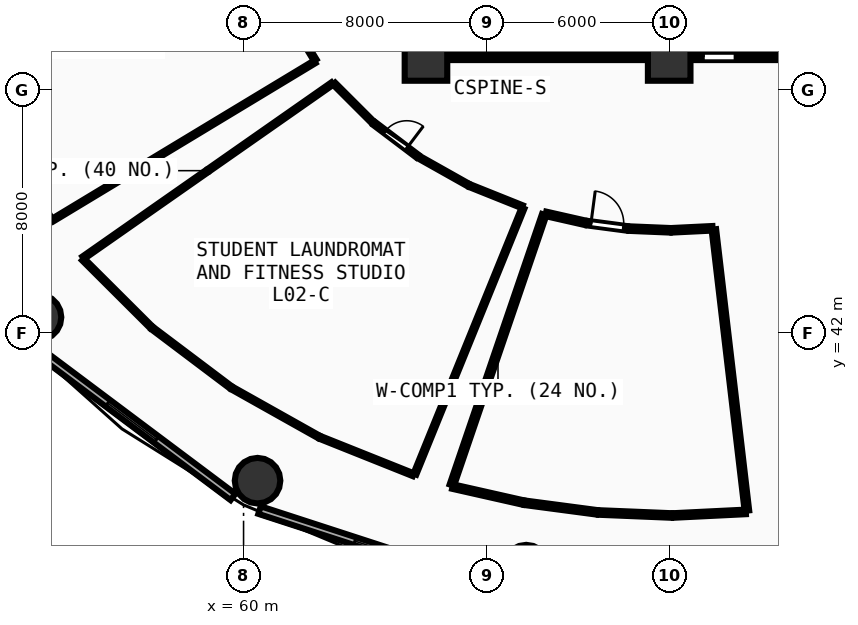
"""IFC4 building model, lengths in metres.
Left out: names, types, materials, properties, quantities, classifications, styles, units other than length and angle.
Written with IfcOpenShell. Run it as: python <this file> out.ifc"""

import sys

from ifc_helpers import new_model, si_unit, direction, frame, frame_2d, origin, origin_2d, place, context, subcontext, project, spatial, rectangle, circle, extrude, element, fill, save


model = new_model("IFC4")
c1 = context("Model", 3, precision=1e-05, world=origin(), true_north=direction((0.0, 1.0)))
c2 = subcontext(c1, "Body", "Model", "MODEL_VIEW")
j1 = project(units=[si_unit("LENGTHUNIT", "METRE"), si_unit("PLANEANGLEUNIT", "RADIAN")], contexts=[c1])
p1 = place(None, origin())
s1 = spatial("IfcSite", under=j1, at=p1, CompositionType="ELEMENT")
p2 = place(p1, origin())
s2 = spatial("IfcBuilding", under=s1, at=p2, CompositionType="ELEMENT")
p3 = place(p2, frame((0.0, 0.0, 9.0)))
s3 = spatial("IfcBuildingStorey", under=s2, at=p3, CompositionType="ELEMENT", Elevation=9.0)
for number, where, z_axis, x_axis in (
    (1, (66.0, 51.0, 0.0), (0.0, 0.0, 1.0), (1.0, 0.0, 0.0)),
    (2, (74.0, 51.0, 0.0), (0.0, 0.0, 1.0), (1.0, 0.0, 0.0)),
):
    element("IfcColumn", number, at=place(p3, frame(where, z_axis=z_axis, x_axis=x_axis)), inside=s3, PredefinedType="PILASTER", context=c2, shape_type="SweptSolid", body=[
        extrude(rectangle(XDim=1.4, YDim=1.4, at=origin_2d()), origin(), (0.0, 0.0, 1.0), 4.5),
    ])
for number, where, z_axis, x_axis in (
    (3, (53.256, 42.522, 0.0), (0.0, 0.0, 1.0), (1.0, 0.0, 0.0)),
    (4, (60.46, 37.146, 0.0), (0.0, 0.0, 1.0), (1.0, 0.0, 0.0)),
    (5, (69.298, 34.286, 0.0), (0.0, 0.0, 1.0), (1.0, 0.0, 0.0)),
):
    element("IfcColumn", number, at=place(p3, frame(where, z_axis=z_axis, x_axis=x_axis)), inside=s3, PredefinedType="COLUMN", context=c2, shape_type="SweptSolid", body=[
        extrude(circle(Radius=0.75, at=origin_2d()), origin(), (0.0, 0.0, 1.0), 4.5),
    ])
p4 = place(p3, frame((53.016, 41.582, 0.0), z_axis=(0.0, 0.0, 1.0), x_axis=(0.80030733173, -0.599590005569, 0.0)))
e6 = element("IfcWall", 6, at=p4, inside=s3, PredefinedType="SOLIDWALL", context=c2, shape_type="SweptSolid", body=[
    extrude(rectangle(XDim=8.291, YDim=0.26, at=frame_2d((4.145, 0.0))), origin(), (0.0, 0.0, 1.0), 4.085),
])
p5 = place(p4, frame((3.145, 0.0, 0.85)))
e7 = element("IfcOpeningElement", 7, at=p5, cuts=e6, PredefinedType="OPENING", context=c2, shape_type="SweptSolid", body=[
    extrude(rectangle(XDim=2.0, YDim=1.75, at=frame_2d((1.0, 0.875))), frame((0.0, 0.14, 0.0), z_axis=(0.0, -1.0, 0.0), x_axis=(1.0, 0.0, 0.0)), (0.0, 0.0, 1.0), 0.28),
])
p6 = place(p3, frame((60.526, 36.178, 0.0), z_axis=(0.0, 0.0, 1.0), x_axis=(0.951039914291, -0.309068085421, 0.0)))
e8 = element("IfcWall", 8, at=p6, inside=s3, PredefinedType="SOLIDWALL", context=c2, shape_type="SweptSolid", body=[
    extrude(rectangle(XDim=8.594, YDim=0.26, at=frame_2d((4.297, 0.0))), origin(), (0.0, 0.0, 1.0), 4.085),
])
p7 = place(p6, frame((3.297, 0.0, 0.85)))
e9 = element("IfcOpeningElement", 9, at=p7, cuts=e8, PredefinedType="OPENING", context=c2, shape_type="SweptSolid", body=[
    extrude(rectangle(XDim=2.0, YDim=1.75, at=frame_2d((1.0, 0.875))), frame((0.0, 0.14, 0.0), z_axis=(0.0, -1.0, 0.0), x_axis=(1.0, 0.0, 0.0)), (0.0, 0.0, 1.0), 0.28),
])
p8 = place(p3, frame((74.0, 51.08, 0.0), z_axis=(0.0, 0.0, 1.0), x_axis=(1.0, 0.0, 0.0)))
e10 = element("IfcWall", 10, at=p8, inside=s3, PredefinedType="SHEAR", context=c2, shape_type="SweptSolid", body=[
    extrude(rectangle(XDim=7.9, YDim=0.2, at=frame_2d((3.95, 0.0))), origin(), (0.0, 0.0, 1.0), 4.1),
])
p9 = place(p8, frame((1.12, 0.0, 0.0)))
e11 = element("IfcOpeningElement", 11, at=p9, cuts=e10, PredefinedType="OPENING", context=c2, shape_type="SweptSolid", body=[
    extrude(rectangle(XDim=1.05, YDim=2.1, at=frame_2d((0.525, 1.05))), frame((0.0, 0.11, 0.0), z_axis=(0.0, -1.0, 0.0), x_axis=(1.0, 0.0, 0.0)), (0.0, 0.0, 1.0), 0.22),
])
p10 = place(p3, frame((74.62, 54.27, 0.0), z_axis=(0.0, 0.0, 1.0), x_axis=(0.0, -1.0, 0.0)))
e12 = element("IfcWall", 12, at=p10, inside=s3, PredefinedType="SHEAR", context=c2, shape_type="SweptSolid", body=[
    extrude(rectangle(XDim=3.07, YDim=0.2, at=frame_2d((1.535, 0.0))), origin(), (0.0, 0.0, 1.0), 4.1),
])
p11 = place(p3, frame((66.26, 51.08, 0.0), z_axis=(0.0, 0.0, 1.0), x_axis=(1.0, 0.0, 0.0)))
e13 = element("IfcWall", 13, at=p11, inside=s3, PredefinedType="SHEAR", context=c2, shape_type="SweptSolid", body=[
    extrude(rectangle(XDim=7.16, YDim=0.2, at=frame_2d((3.58, 0.0))), origin(), (0.0, 0.0, 1.0), 4.1),
])
p12 = place(p3, frame((73.54, 51.2, 0.0), z_axis=(0.0, 0.0, 1.0), x_axis=(0.0, 1.0, 0.0)))
e14 = element("IfcWall", 14, at=p12, inside=s3, PredefinedType="SHEAR", context=c2, shape_type="SweptSolid", body=[
    extrude(rectangle(XDim=3.07, YDim=0.2, at=frame_2d((1.535, 0.0))), origin(), (0.0, 0.0, 1.0), 4.1),
])
p13 = place(p3, frame((66.14, 54.27, 0.0), z_axis=(0.0, 0.0, 1.0), x_axis=(0.0, -1.0, 0.0)))
e15 = element("IfcWall", 15, at=p13, inside=s3, PredefinedType="SHEAR", context=c2, shape_type="SweptSolid", body=[
    extrude(rectangle(XDim=3.07, YDim=0.2, at=frame_2d((1.535, 0.0))), origin(), (0.0, 0.0, 1.0), 4.1),
])
p14 = place(p13, frame((1.01, 0.0, 0.0)))
e16 = element("IfcOpeningElement", 16, at=p14, cuts=e15, PredefinedType="OPENING", context=c2, shape_type="SweptSolid", body=[
    extrude(rectangle(XDim=1.05, YDim=2.1, at=frame_2d((0.525, 1.05))), frame((0.0, 0.11, 0.0), z_axis=(0.0, -1.0, 0.0), x_axis=(1.0, 0.0, 0.0)), (0.0, 0.0, 1.0), 0.22),
])
p15 = place(p3, frame((64.309, 48.886, 0.0), z_axis=(0.0, 0.0, 1.0), x_axis=(0.797861385226, -0.602840949144, 0.0)))
e17 = element("IfcWall", 17, at=p15, inside=s3, PredefinedType="PARTITIONING", context=c2, shape_type="SweptSolid", body=[
    extrude(rectangle(XDim=1.758, YDim=0.12, at=frame_2d((0.879, 0.0))), origin(), (0.0, 0.0, 1.0), 3.485),
])
p16 = place(p15, frame((0.429, 0.0, 0.0)))
e18 = element("IfcOpeningElement", 18, at=p16, cuts=e17, PredefinedType="OPENING", context=c2, shape_type="SweptSolid", body=[
    extrude(rectangle(XDim=0.9, YDim=2.08, at=frame_2d((0.45, 1.04))), frame((0.0, 0.07, 0.0), z_axis=(0.0, -1.0, 0.0), x_axis=(1.0, 0.0, 0.0)), (0.0, 0.0, 1.0), 0.14),
])
p17 = place(p3, frame((71.324, 45.614, 0.0), z_axis=(0.0, 0.0, 1.0), x_axis=(0.991368591811, -0.131104214925, 0.0)))
e19 = element("IfcWall", 19, at=p17, inside=s3, PredefinedType="PARTITIONING", context=c2, shape_type="SweptSolid", body=[
    extrude(rectangle(XDim=1.283, YDim=0.15, at=frame_2d((0.642, 0.0))), origin(), (0.0, 0.0, 1.0), 4.09),
])
p18 = place(p17, frame((0.102, 0.0, 0.0)))
e20 = element("IfcOpeningElement", 20, at=p18, cuts=e19, PredefinedType="OPENING", context=c2, shape_type="SweptSolid", body=[
    extrude(rectangle(XDim=1.08, YDim=2.1, at=frame_2d((0.54, 1.05))), frame((0.0, 0.085, 0.0), z_axis=(0.0, -1.0, 0.0), x_axis=(1.0, 0.0, 0.0)), (0.0, 0.0, 1.0), 0.17),
])
p19 = place(p3, frame((61.164, 52.934, 0.0), z_axis=(0.0, 0.0, 1.0), x_axis=(0.520406594215, -0.853918600745, 0.0)))
e21 = element("IfcWall", 21, at=p19, inside=s3, PredefinedType="PARTITIONING", context=c2, shape_type="SweptSolid", body=[
    extrude(rectangle(XDim=2.291, YDim=0.1, at=frame_2d((1.146, 0.0))), origin(), (0.0, 0.0, 1.0), 4.09),
])
p20 = place(p3, frame((62.343, 50.922, 0.0), z_axis=(0.0, 0.0, 1.0), x_axis=(-0.856094808971, -0.516818805824, 0.0)))
e22 = element("IfcWall", 22, at=p20, inside=s3, PredefinedType="PARTITIONING", context=c2, shape_type="SweptSolid", body=[
    extrude(rectangle(XDim=10.069, YDim=0.1, at=frame_2d((5.034, 0.0))), origin(), (0.0, 0.0, 1.0), 3.485),
])
p21 = place(p3, frame((53.668, 45.732, 0.0), z_axis=(0.0, 0.0, 1.0), x_axis=(-0.521408625916, 0.853307122214, 0.0)))
e23 = element("IfcWall", 23, at=p21, inside=s3, PredefinedType="PARTITIONING", context=c2, shape_type="SweptSolid", body=[
    extrude(rectangle(XDim=4.057, YDim=0.1, at=frame_2d((2.028, 0.0))), origin(), (0.0, 0.0, 1.0), 4.09),
])
p22 = place(p3, frame((62.98, 50.202, 0.0), z_axis=(0.0, 0.0, 1.0), x_axis=(0.707382510062, -0.706830944752, 0.0)))
e24 = element("IfcWall", 24, at=p22, inside=s3, PredefinedType="PARTITIONING", context=c2, shape_type="SweptSolid", body=[
    extrude(rectangle(XDim=1.771, YDim=0.1, at=frame_2d((0.885, 0.0))), origin(), (0.0, 0.0, 1.0), 3.485),
])
p23 = place(p3, frame((65.794, 47.771, 0.0), z_axis=(0.0, 0.0, 1.0), x_axis=(0.871593417153, -0.490229451559, 0.0)))
e25 = element("IfcWall", 25, at=p23, inside=s3, PredefinedType="PARTITIONING", context=c2, shape_type="SweptSolid", body=[
    extrude(rectangle(XDim=1.823, YDim=0.1, at=frame_2d((0.912, 0.0))), origin(), (0.0, 0.0, 1.0), 3.485),
])
p24 = place(p3, frame((67.455, 46.842, 0.0), z_axis=(0.0, 0.0, 1.0), x_axis=(0.928312348694, -0.371801268505, 0.0)))
e26 = element("IfcWall", 26, at=p24, inside=s3, PredefinedType="PARTITIONING", context=c2, shape_type="SweptSolid", body=[
    extrude(rectangle(XDim=1.845, YDim=0.1, at=frame_2d((0.923, 0.0))), origin(), (0.0, 0.0, 1.0), 4.09),
])
p25 = place(p3, frame((69.19, 46.104, 0.0), z_axis=(0.0, 0.0, 1.0), x_axis=(-0.376680340497, -0.926343306276, 0.0)))
e27 = element("IfcWall", 27, at=p25, inside=s3, PredefinedType="PARTITIONING", context=c2, shape_type="SweptSolid", body=[
    extrude(rectangle(XDim=9.435, YDim=0.1, at=frame_2d((4.717, 0.0))), origin(), (0.0, 0.0, 1.0), 3.485),
])
p26 = place(p3, frame((65.584, 37.342, 0.0), z_axis=(0.0, 0.0, 1.0), x_axis=(-0.928584342938, 0.371121433024, 0.0)))
e28 = element("IfcWall", 28, at=p26, inside=s3, PredefinedType="PARTITIONING", context=c2, shape_type="SweptSolid", body=[
    extrude(rectangle(XDim=3.283, YDim=0.1, at=frame_2d((1.642, 0.0))), origin(), (0.0, 0.0, 1.0), 4.09),
])
p27 = place(p3, frame((62.463, 38.594, 0.0), z_axis=(0.0, 0.0, 1.0), x_axis=(-0.872051400069, 0.489414298563, 0.0)))
e29 = element("IfcWall", 29, at=p27, inside=s3, PredefinedType="PARTITIONING", context=c2, shape_type="SweptSolid", body=[
    extrude(rectangle(XDim=3.244, YDim=0.1, at=frame_2d((1.622, 0.0))), origin(), (0.0, 0.0, 1.0), 3.485),
])
p28 = place(p3, frame((59.567, 40.226, 0.0), z_axis=(0.0, 0.0, 1.0), x_axis=(-0.79862386003, 0.601830482936, 0.0)))
e30 = element("IfcWall", 30, at=p28, inside=s3, PredefinedType="PARTITIONING", context=c2, shape_type="SweptSolid", body=[
    extrude(rectangle(XDim=3.198, YDim=0.1, at=frame_2d((1.599, 0.0))), origin(), (0.0, 0.0, 1.0), 4.09),
])
p29 = place(p3, frame((56.953, 42.203, 0.0), z_axis=(0.0, 0.0, 1.0), x_axis=(-0.708152537588, 0.7060594759, 0.0)))
e31 = element("IfcWall", 31, at=p29, inside=s3, PredefinedType="PARTITIONING", context=c2, shape_type="SweptSolid", body=[
    extrude(rectangle(XDim=3.149, YDim=0.1, at=frame_2d((1.575, 0.0))), origin(), (0.0, 0.0, 1.0), 3.485),
])
p30 = place(p3, frame((54.727, 44.478, 0.0), z_axis=(0.0, 0.0, 1.0), x_axis=(0.819486544078, 0.573098424422, 0.0)))
e32 = element("IfcWall", 32, at=p30, inside=s3, PredefinedType="PARTITIONING", context=c2, shape_type="SweptSolid", body=[
    extrude(rectangle(XDim=9.997, YDim=0.1, at=frame_2d((4.999, 0.0))), origin(), (0.0, 0.0, 1.0), 3.785),
])
p31 = place(p3, frame((69.94, 45.922, 0.0), z_axis=(0.0, 0.0, 1.0), x_axis=(0.975303517649, -0.220868849005, 0.0)))
e33 = element("IfcWall", 33, at=p31, inside=s3, PredefinedType="PARTITIONING", context=c2, shape_type="SweptSolid", body=[
    extrude(rectangle(XDim=1.319, YDim=0.15, at=frame_2d((0.659, 0.0))), origin(), (0.0, 0.0, 1.0), 4.09),
])
p32 = place(p3, frame((72.696, 45.436, 0.0), z_axis=(0.0, 0.0, 1.0), x_axis=(0.99914926966, -0.041239991967, 0.0)))
e34 = element("IfcWall", 34, at=p32, inside=s3, PredefinedType="PARTITIONING", context=c2, shape_type="SweptSolid", body=[
    extrude(rectangle(XDim=1.326, YDim=0.15, at=frame_2d((0.663, 0.0))), origin(), (0.0, 0.0, 1.0), 4.09),
])
p33 = place(p3, frame((74.101, 45.382, 0.0), z_axis=(0.0, 0.0, 1.0), x_axis=(0.998799198372, 0.04899144141, 0.0)))
e35 = element("IfcWall", 35, at=p33, inside=s3, PredefinedType="PARTITIONING", context=c2, shape_type="SweptSolid", body=[
    extrude(rectangle(XDim=1.326, YDim=0.15, at=frame_2d((0.663, 0.0))), origin(), (0.0, 0.0, 1.0), 4.09),
])
p34 = place(p3, frame((75.47, 45.409, 0.0), z_axis=(0.0, 0.0, 1.0), x_axis=(0.116693695048, -0.99316795233, 0.0)))
e36 = element("IfcWall", 36, at=p34, inside=s3, PredefinedType="PARTITIONING", context=c2, shape_type="SweptSolid", body=[
    extrude(rectangle(XDim=9.312, YDim=0.15, at=frame_2d((4.656, 0.0))), origin(), (0.0, 0.0, 1.0), 3.785),
])
for number, where, z_axis, x_axis in (
    (37, (76.521, 36.119, 0.0), (0.0, 0.0, 1.0), (-0.999, -0.049, 0.0)),
    (38, (74.067, 36.002, 0.0), (0.0, 0.0, 1.0), (-0.999, 0.041, 0.0)),
):
    element("IfcWall", number, at=place(p3, frame(where, z_axis=z_axis, x_axis=x_axis)), inside=s3, PredefinedType="PARTITIONING", context=c2, shape_type="SweptSolid", body=[
        extrude(rectangle(XDim=2.377, YDim=0.15, at=frame_2d((1.188, 0.0))), origin(), (0.0, 0.0, 1.0), 4.09),
    ])
p35 = place(p3, frame((71.612, 36.106, 0.0), z_axis=(0.0, 0.0, 1.0), x_axis=(-0.991346104904, 0.131274141745, 0.0)))
e39 = element("IfcWall", 39, at=p35, inside=s3, PredefinedType="PARTITIONING", context=c2, shape_type="SweptSolid", body=[
    extrude(rectangle(XDim=2.373, YDim=0.15, at=frame_2d((1.187, 0.0))), origin(), (0.0, 0.0, 1.0), 4.09),
])
p36 = place(p3, frame((69.181, 36.432, 0.0), z_axis=(0.0, 0.0, 1.0), x_axis=(-0.975459616938, 0.220178417932, 0.0)))
e40 = element("IfcWall", 40, at=p36, inside=s3, PredefinedType="PARTITIONING", context=c2, shape_type="SweptSolid", body=[
    extrude(rectangle(XDim=2.363, YDim=0.15, at=frame_2d((1.182, 0.0))), origin(), (0.0, 0.0, 1.0), 3.485),
])
p37 = place(p3, frame((66.85, 36.999, 0.0), z_axis=(0.0, 0.0, 1.0), x_axis=(0.323263569932, 0.946308968759, 0.0)))
e41 = element("IfcWall", 41, at=p37, inside=s3, PredefinedType="PARTITIONING", context=c2, shape_type="SweptSolid", body=[
    extrude(rectangle(XDim=9.399, YDim=0.15, at=frame_2d((4.699, 0.0))), origin(), (0.0, 0.0, 1.0), 3.485),
])
p38 = place(p5, origin())
e42 = element("IfcWindow", 42, at=p38, inside=s3, PartitioningType="SINGLE_PANEL", PredefinedType="WINDOW", context=c2, shape_type="SweptSolid", body=[
    extrude(rectangle(XDim=2.0, YDim=1.75, at=frame_2d((1.0, 0.875))), frame((0.0, 0.03, 0.0), z_axis=(0.0, -1.0, 0.0), x_axis=(1.0, 0.0, 0.0)), (0.0, 0.0, 1.0), 0.06),
])
fill(e7, e42)
p39 = place(p7, origin())
e43 = element("IfcWindow", 43, at=p39, inside=s3, PartitioningType="SINGLE_PANEL", PredefinedType="WINDOW", context=c2, shape_type="SweptSolid", body=[
    extrude(rectangle(XDim=2.0, YDim=1.75, at=frame_2d((1.0, 0.875))), frame((0.0, 0.03, 0.0), z_axis=(0.0, -1.0, 0.0), x_axis=(1.0, 0.0, 0.0)), (0.0, 0.0, 1.0), 0.06),
])
fill(e9, e43)
p40 = place(p9, origin())
e44 = element("IfcDoor", 44, at=p40, inside=s3, OperationType="SINGLE_SWING_LEFT", PredefinedType="DOOR", context=c2, shape_type="SweptSolid", body=[
    extrude(rectangle(XDim=1.05, YDim=2.1, at=frame_2d((0.525, 1.05))), frame((0.0, 0.025, 0.0), z_axis=(0.0, -1.0, 0.0), x_axis=(1.0, 0.0, 0.0)), (0.0, 0.0, 1.0), 0.05),
])
fill(e11, e44)
p41 = place(p16, origin())
e45 = element("IfcDoor", 45, at=p41, inside=s3, OperationType="SINGLE_SWING_RIGHT", PredefinedType="DOOR", context=c2, shape_type="SweptSolid", body=[
    extrude(rectangle(XDim=0.9, YDim=2.08, at=frame_2d((0.45, 1.04))), frame((0.0, 0.025, 0.0), z_axis=(0.0, -1.0, 0.0), x_axis=(1.0, 0.0, 0.0)), (0.0, 0.0, 1.0), 0.05),
])
fill(e18, e45)
p42 = place(p18, origin())
e46 = element("IfcDoor", 46, at=p42, inside=s3, OperationType="SINGLE_SWING_LEFT", PredefinedType="DOOR", context=c2, shape_type="SweptSolid", body=[
    extrude(rectangle(XDim=1.08, YDim=2.1, at=frame_2d((0.54, 1.05))), frame((0.0, 0.025, 0.0), z_axis=(0.0, -1.0, 0.0), x_axis=(1.0, 0.0, 0.0)), (0.0, 0.0, 1.0), 0.05),
])
fill(e20, e46)
save(model, sys.argv[1])
